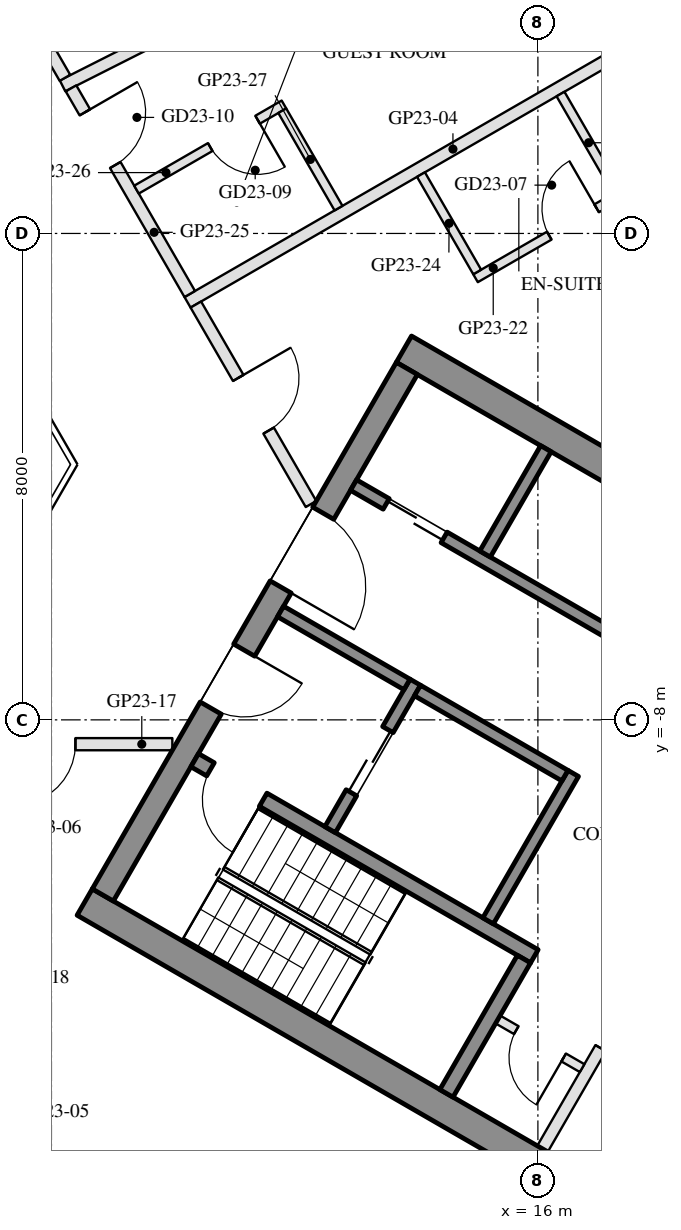
"""IFC4 building model, lengths in metres.
Left out: names, types, materials, properties, quantities, classifications, styles, units other than length and angle.
Written with IfcOpenShell. Run it as: python <this file> out.ifc"""

import sys

from ifc_helpers import new_model, si_unit, direction, frame, frame_2d, origin, place, context, subcontext, project, spatial, rectangle, extrude, element, fill, save


model = new_model("IFC4")
c1 = context("Model", 3, precision=1e-05, world=origin(), true_north=direction((0.0, 1.0)))
c2 = subcontext(c1, "Body", "Model", "MODEL_VIEW")
j1 = project(units=[si_unit("LENGTHUNIT", "METRE"), si_unit("PLANEANGLEUNIT", "RADIAN")], contexts=[c1])
p1 = place(None, origin())
s1 = spatial("IfcSite", under=j1, at=p1, CompositionType="ELEMENT")
p2 = place(p1, origin())
s2 = spatial("IfcBuilding", under=s1, at=p2, CompositionType="ELEMENT")
p3 = place(p2, frame((0.0, 0.0, 250.4)))
s3 = spatial("IfcBuildingStorey", under=s2, at=p3, CompositionType="ELEMENT", Elevation=250.4)
p4 = place(p3, frame((19.729, 2.938, 0.0), z_axis=(0.0, 0.0, 1.0), x_axis=(-0.499976430342, 0.866039011305, 0.0)))
e1 = element("IfcWall", 1, at=p4, inside=s3, PredefinedType="SOLIDWALL", context=c2, shape_type="SweptSolid", body=[
    extrude(rectangle(XDim=6.74, YDim=0.35, at=frame_2d((3.37, 0.0))), origin(), (0.0, 0.0, 1.0), 3.55),
])
p5 = place(p4, frame((1.67, 0.0, 0.0)))
e2 = element("IfcOpeningElement", 2, at=p5, cuts=e1, PredefinedType="OPENING", context=c2, shape_type="SweptSolid", body=[
    extrude(rectangle(XDim=1.5, YDim=2.4, at=frame_2d((0.75, 1.2))), frame((0.0, 0.185, 0.0), z_axis=(0.0, -1.0, 0.0), x_axis=(1.0, 0.0, 0.0)), (0.0, 0.0, 1.0), 0.37),
])
p6 = place(p4, frame((3.47, 0.0, 0.3)))
e3 = element("IfcOpeningElement", 3, at=p6, cuts=e1, PredefinedType="OPENING", context=c2, shape_type="SweptSolid", body=[
    extrude(rectangle(XDim=0.8, YDim=2.65, at=frame_2d((0.4, 1.325))), frame((0.0, 0.185, 0.0), z_axis=(0.0, -1.0, 0.0), x_axis=(1.0, 0.0, 0.0)), (0.0, 0.0, 1.0), 0.37),
])
for number, where, z_axis, x_axis in (
    (4, (8.547, -10.997, 0.0), (0.0, 0.0, 1.0), (0.866, -0.5, 0.0)),
    (5, (13.797, -1.903, 0.0), (0.0, 0.0, 1.0), (0.866, -0.5, 0.0)),
):
    element("IfcWall", number, at=place(p3, frame(where, z_axis=z_axis, x_axis=x_axis)), inside=s3, PredefinedType="SHEAR", context=c2, shape_type="SweptSolid", body=[
        extrude(rectangle(XDim=14.837, YDim=0.5, at=frame_2d((7.418, 0.0))), origin(), (0.0, 0.0, 1.0), 3.5),
    ])
p7 = place(p3, frame((8.845, -10.88, 0.0), z_axis=(0.0, 0.0, 1.0), x_axis=(0.500004234368, 0.866022959057, 0.0)))
e6 = element("IfcWall", 6, at=p7, inside=s3, PredefinedType="SHEAR", context=c2, shape_type="SweptSolid", body=[
    extrude(rectangle(XDim=10.0, YDim=0.4, at=frame_2d((5.0, 0.0))), origin(), (0.0, 0.0, 1.0), 3.5),
])
p8 = place(p7, frame((3.55, 0.0, 0.0)))
e7 = element("IfcOpeningElement", 7, at=p8, cuts=e6, PredefinedType="OPENING", context=c2, shape_type="SweptSolid", body=[
    extrude(rectangle(XDim=1.1, YDim=2.1, at=frame_2d((0.55, 1.05))), frame((0.0, 0.21, 0.0), z_axis=(0.0, -1.0, 0.0), x_axis=(1.0, 0.0, 0.0)), (0.0, 0.0, 1.0), 0.42),
])
p9 = place(p7, frame((5.85, 0.0, 0.0)))
e8 = element("IfcOpeningElement", 8, at=p9, cuts=e6, PredefinedType="OPENING", context=c2, shape_type="SweptSolid", body=[
    extrude(rectangle(XDim=1.4, YDim=2.1, at=frame_2d((0.7, 1.05))), frame((0.0, 0.21, 0.0), z_axis=(0.0, -1.0, 0.0), x_axis=(1.0, 0.0, 0.0)), (0.0, 0.0, 1.0), 0.42),
])
p10 = place(p3, frame((10.356, -8.664, 0.0), z_axis=(0.0, 0.0, 1.0), x_axis=(0.866028629588, -0.499994412703, 0.0)))
e9 = element("IfcWall", 9, at=p10, inside=s3, PredefinedType="SHEAR", context=c2, shape_type="SweptSolid", body=[
    extrude(rectangle(XDim=6.45, YDim=0.25, at=frame_2d((3.225, 0.0))), origin(), (0.0, 0.0, 1.0), 3.5),
])
p11 = place(p10, frame((0.3, 0.0, 0.0)))
e10 = element("IfcOpeningElement", 10, at=p11, cuts=e9, PredefinedType="OPENING", context=c2, shape_type="SweptSolid", body=[
    extrude(rectangle(XDim=1.0, YDim=2.1, at=frame_2d((0.5, 1.05))), frame((0.0, 0.135, 0.0), z_axis=(0.0, -1.0, 0.0), x_axis=(1.0, 0.0, 0.0)), (0.0, 0.0, 1.0), 0.27),
])
p12 = place(p3, frame((14.496, -14.143, 0.0), z_axis=(0.0, 0.0, 1.0), x_axis=(0.500062241894, 0.865989465428, 0.0)))
e11 = element("IfcWall", 11, at=p12, inside=s3, PredefinedType="SHEAR", context=c2, shape_type="SweptSolid", body=[
    extrude(rectangle(XDim=2.55, YDim=0.25, at=frame_2d((1.275, 0.0))), origin(), (0.0, 0.0, 1.0), 3.5),
])
p13 = place(p3, frame((15.181, -11.305, 0.0), z_axis=(0.0, 0.0, 1.0), x_axis=(0.49994636267, 0.866056369097, 0.0)))
e12 = element("IfcWall", 12, at=p13, inside=s3, PredefinedType="SHEAR", context=c2, shape_type="SweptSolid", body=[
    extrude(rectangle(XDim=2.8, YDim=0.2, at=frame_2d((1.4, 0.0))), origin(), (0.0, 0.0, 1.0), 3.5),
])
p14 = place(p3, frame((12.583, -9.805, 0.0), z_axis=(0.0, 0.0, 1.0), x_axis=(0.49994636267, 0.866056369097, 0.0)))
e13 = element("IfcWall", 13, at=p14, inside=s3, PredefinedType="SHEAR", context=c2, shape_type="SweptSolid", body=[
    extrude(rectangle(XDim=2.8, YDim=0.2, at=frame_2d((1.4, 0.0))), origin(), (0.0, 0.0, 1.0), 3.5),
])
p15 = place(p14, frame((0.7, 0.0, 0.0)))
e14 = element("IfcOpeningElement", 14, at=p15, cuts=e13, PredefinedType="OPENING", context=c2, shape_type="SweptSolid", body=[
    extrude(rectangle(XDim=1.2, YDim=2.1, at=frame_2d((0.6, 1.05))), frame((0.0, 0.11, 0.0), z_axis=(0.0, -1.0, 0.0), x_axis=(1.0, 0.0, 0.0)), (0.0, 0.0, 1.0), 0.22),
])
p16 = place(p3, frame((11.768, -6.217, 0.0), z_axis=(0.0, 0.0, 1.0), x_axis=(0.866050077142, -0.499957262057, 0.0)))
e15 = element("IfcWall", 15, at=p16, inside=s3, PredefinedType="SHEAR", context=c2, shape_type="SweptSolid", body=[
    extrude(rectangle(XDim=2.4, YDim=0.2, at=frame_2d((1.2, 0.0))), origin(), (0.0, 0.0, 1.0), 3.5),
])
p17 = place(p3, frame((14.02, -7.517, 0.0), z_axis=(0.0, 0.0, 1.0), x_axis=(0.866034573852, -0.49998411664, 0.0)))
e16 = element("IfcWall", 16, at=p17, inside=s3, PredefinedType="SHEAR", context=c2, shape_type="SweptSolid", body=[
    extrude(rectangle(XDim=2.8, YDim=0.2, at=frame_2d((1.4, 0.0))), origin(), (0.0, 0.0, 1.0), 3.5),
])
p18 = place(p3, frame((12.968, -4.138, 0.0), z_axis=(0.0, 0.0, 1.0), x_axis=(0.866028328073, -0.49999493495, 0.0)))
e17 = element("IfcWall", 17, at=p18, inside=s3, PredefinedType="SHEAR", context=c2, shape_type="SweptSolid", body=[
    extrude(rectangle(XDim=10.16, YDim=0.2, at=frame_2d((5.08, 0.0))), origin(), (0.0, 0.0, 1.0), 3.5),
])
p19 = place(p18, frame((0.62, 0.0, 0.0)))
e18 = element("IfcOpeningElement", 18, at=p19, cuts=e17, PredefinedType="OPENING", context=c2, shape_type="SweptSolid", body=[
    extrude(rectangle(XDim=1.1, YDim=2.1, at=frame_2d((0.55, 1.05))), frame((0.0, 0.11, 0.0), z_axis=(0.0, -1.0, 0.0), x_axis=(1.0, 0.0, 0.0)), (0.0, 0.0, 1.0), 0.22),
])
p20 = place(p18, frame((5.8, 0.0, 0.0)))
e19 = element("IfcOpeningElement", 19, at=p20, cuts=e17, PredefinedType="OPENING", context=c2, shape_type="SweptSolid", body=[
    extrude(rectangle(XDim=0.9, YDim=2.1, at=frame_2d((0.45, 1.05))), frame((0.0, 0.11, 0.0), z_axis=(0.0, -1.0, 0.0), x_axis=(1.0, 0.0, 0.0)), (0.0, 0.0, 1.0), 0.22),
])
p21 = place(p3, frame((15.131, -5.272, 0.0), z_axis=(0.0, 0.0, 1.0), x_axis=(0.499972520799, 0.866041268327, 0.0)))
e20 = element("IfcWall", 20, at=p21, inside=s3, PredefinedType="SHEAR", context=c2, shape_type="SweptSolid", body=[
    extrude(rectangle(XDim=2.0, YDim=0.2, at=frame_2d((1.0, 0.0))), origin(), (0.0, 0.0, 1.0), 3.5),
])
p22 = place(p3, frame((16.076, -15.055, 0.0), z_axis=(0.0, 0.0, 1.0), x_axis=(0.499995103361, 0.866028230842, 0.0)))
e21 = element("IfcWall", 21, at=p22, inside=s3, PredefinedType="PARTITIONING", context=c2, shape_type="SweptSolid", body=[
    extrude(rectangle(XDim=5.4, YDim=0.2, at=frame_2d((2.7, 0.0))), origin(), (0.0, 0.0, 1.0), 3.5),
])
p23 = place(p22, frame((1.913, 0.0, 0.0)))
e22 = element("IfcOpeningElement", 22, at=p23, cuts=e21, PredefinedType="OPENING", context=c2, shape_type="SweptSolid", body=[
    extrude(rectangle(XDim=0.9, YDim=2.1, at=frame_2d((0.45, 1.05))), frame((0.0, 0.11, 0.0), z_axis=(0.0, -1.0, 0.0), x_axis=(1.0, 0.0, 0.0)), (0.0, 0.0, 1.0), 0.22),
])
p24 = place(p22, frame((3.788, 0.0, 0.0)))
e23 = element("IfcOpeningElement", 23, at=p24, cuts=e21, PredefinedType="OPENING", context=c2, shape_type="SweptSolid", body=[
    extrude(rectangle(XDim=0.9, YDim=2.1, at=frame_2d((0.45, 1.05))), frame((0.0, 0.11, 0.0), z_axis=(0.0, -1.0, 0.0), x_axis=(1.0, 0.0, 0.0)), (0.0, 0.0, 1.0), 0.22),
])
p25 = place(p3, frame((15.342, -12.928, 0.0), z_axis=(0.0, 0.0, 1.0), x_axis=(0.865989903783, -0.500061482766, 0.0)))
e24 = element("IfcWall", 24, at=p25, inside=s3, PredefinedType="PARTITIONING", context=c2, shape_type="SweptSolid", body=[
    extrude(rectangle(XDim=1.6, YDim=0.15, at=frame_2d((0.8, 0.0))), origin(), (0.0, 0.0, 1.0), 3.5),
])
p26 = place(p25, frame((0.35, 0.0, 0.0)))
e25 = element("IfcOpeningElement", 25, at=p26, cuts=e24, PredefinedType="OPENING", context=c2, shape_type="SweptSolid", body=[
    extrude(rectangle(XDim=0.9, YDim=2.1, at=frame_2d((0.45, 1.05))), frame((0.0, 0.085, 0.0), z_axis=(0.0, -1.0, 0.0), x_axis=(1.0, 0.0, 0.0)), (0.0, 0.0, 1.0), 0.17),
])
p27 = place(p3, frame((18.968, 3.907, 0.0), z_axis=(0.0, 0.0, 1.0), x_axis=(-0.866022637375, -0.500004791531, 0.0)))
e26 = element("IfcWall", 26, at=p27, inside=s3, PredefinedType="PARTITIONING", context=c2, shape_type="SweptSolid", body=[
    extrude(rectangle(XDim=10.08, YDim=0.2, at=frame_2d((5.04, 0.0))), origin(), (0.0, 0.0, 1.0), 3.1),
])
p28 = place(p3, frame((17.192, 6.982, 0.0), z_axis=(0.0, 0.0, 1.0), x_axis=(-0.892469554868, -0.451107629766, 0.0)))
e27 = element("IfcWall", 27, at=p28, inside=s3, PredefinedType="PARTITIONING", context=c2, shape_type="SweptSolid", body=[
    extrude(rectangle(XDim=10.096, YDim=0.2, at=frame_2d((5.048, 0.0))), origin(), (0.0, 0.0, 1.0), 3.1),
])
p29 = place(p3, frame((9.988, -8.4, 0.0), z_axis=(0.0, 0.0, 1.0), x_axis=(-1.0, 0.0, 0.0)))
e28 = element("IfcWall", 28, at=p29, inside=s3, PredefinedType="PARTITIONING", context=c2, shape_type="SweptSolid", body=[
    extrude(rectangle(XDim=4.188, YDim=0.2, at=frame_2d((2.094, 0.0))), origin(), (0.0, 0.0, 1.0), 2.95),
])
p30 = place(p29, frame((1.594, 0.0, 0.0)))
e29 = element("IfcOpeningElement", 29, at=p30, cuts=e28, PredefinedType="OPENING", context=c2, shape_type="SweptSolid", body=[
    extrude(rectangle(XDim=1.0, YDim=2.1, at=frame_2d((0.5, 1.05))), frame((0.0, 0.11, 0.0), z_axis=(0.0, -1.0, 0.0), x_axis=(1.0, 0.0, 0.0)), (0.0, 0.0, 1.0), 0.22),
])
p31 = place(p3, frame((10.375, -1.169, 0.0), z_axis=(0.0, 0.0, 1.0), x_axis=(0.500055316652, -0.865993464345, 0.0)))
e30 = element("IfcWall", 30, at=p31, inside=s3, PredefinedType="PARTITIONING", context=c2, shape_type="SweptSolid", body=[
    extrude(rectangle(XDim=3.788, YDim=0.2, at=frame_2d((1.894, 0.0))), origin(), (0.0, 0.0, 1.0), 2.95),
])
p32 = place(p31, frame((1.394, 0.0, 0.0)))
e31 = element("IfcOpeningElement", 31, at=p32, cuts=e30, PredefinedType="OPENING", context=c2, shape_type="SweptSolid", body=[
    extrude(rectangle(XDim=1.0, YDim=2.1, at=frame_2d((0.5, 1.05))), frame((0.0, 0.11, 0.0), z_axis=(0.0, -1.0, 0.0), x_axis=(1.0, 0.0, 0.0)), (0.0, 0.0, 1.0), 0.22),
])
p33 = place(p3, frame((14.974, -0.737, 0.0), z_axis=(0.0, 0.0, 1.0), x_axis=(0.866018616679, 0.500011755427, 0.0)))
e32 = element("IfcWall", 32, at=p33, inside=s3, PredefinedType="PARTITIONING", context=c2, shape_type="SweptSolid", body=[
    extrude(rectangle(XDim=2.8, YDim=0.15, at=frame_2d((1.4, 0.0))), origin(), (0.0, 0.0, 1.0), 3.55),
])
p34 = place(p33, frame((1.4, 0.0, 0.0)))
e33 = element("IfcOpeningElement", 33, at=p34, cuts=e32, PredefinedType="OPENING", context=c2, shape_type="SweptSolid", body=[
    extrude(rectangle(XDim=0.9, YDim=2.1, at=frame_2d((0.45, 1.05))), frame((0.0, 0.085, 0.0), z_axis=(0.0, -1.0, 0.0), x_axis=(1.0, 0.0, 0.0)), (0.0, 0.0, 1.0), 0.17),
])
p35 = place(p3, frame((17.297, 0.691, 0.0), z_axis=(0.0, 0.0, 1.0), x_axis=(-0.499985172903, 0.866033964044, 0.0)))
e34 = element("IfcWall", 34, at=p35, inside=s3, PredefinedType="PARTITIONING", context=c2, shape_type="SweptSolid", body=[
    extrude(rectangle(XDim=1.85, YDim=0.15, at=frame_2d((0.925, 0.0))), origin(), (0.0, 0.0, 1.0), 2.95),
])
p36 = place(p3, frame((15.002, -0.634, 0.0), z_axis=(0.0, 0.0, 1.0), x_axis=(-0.500042316284, 0.866000971088, 0.0)))
e35 = element("IfcWall", 35, at=p36, inside=s3, PredefinedType="PARTITIONING", context=c2, shape_type="SweptSolid", body=[
    extrude(rectangle(XDim=1.85, YDim=0.15, at=frame_2d((0.925, 0.0))), origin(), (0.0, 0.0, 1.0), 2.95),
])
p37 = place(p3, frame((8.322, 2.386, 0.0), z_axis=(0.0, 0.0, 1.0), x_axis=(0.499998439657, -0.866026304647, 0.0)))
e36 = element("IfcWall", 36, at=p37, inside=s3, PredefinedType="PARTITIONING", context=c2, shape_type="SweptSolid", body=[
    extrude(rectangle(XDim=3.905, YDim=0.2, at=frame_2d((1.953, 0.0))), origin(), (0.0, 0.0, 1.0), 2.95),
])
p38 = place(p37, frame((0.455, 0.0, 0.0)))
e37 = element("IfcOpeningElement", 37, at=p38, cuts=e36, PredefinedType="OPENING", context=c2, shape_type="SweptSolid", body=[
    extrude(rectangle(XDim=1.0, YDim=2.1, at=frame_2d((0.5, 1.05))), frame((0.0, 0.11, 0.0), z_axis=(0.0, -1.0, 0.0), x_axis=(1.0, 0.0, 0.0)), (0.0, 0.0, 1.0), 0.22),
])
p39 = place(p3, frame((11.823, 2.121, 0.0), z_axis=(0.0, 0.0, 1.0), x_axis=(-0.866034573852, -0.49998411664, 0.0)))
e38 = element("IfcWall", 38, at=p39, inside=s3, PredefinedType="PARTITIONING", context=c2, shape_type="SweptSolid", body=[
    extrude(rectangle(XDim=2.8, YDim=0.15, at=frame_2d((1.4, 0.0))), origin(), (0.0, 0.0, 1.0), 2.95),
])
p40 = place(p39, frame((0.5, 0.0, 0.0)))
e39 = element("IfcOpeningElement", 39, at=p40, cuts=e38, PredefinedType="OPENING", context=c2, shape_type="SweptSolid", body=[
    extrude(rectangle(XDim=0.9, YDim=2.1, at=frame_2d((0.45, 1.05))), frame((0.0, 0.085, 0.0), z_axis=(0.0, -1.0, 0.0), x_axis=(1.0, 0.0, 0.0)), (0.0, 0.0, 1.0), 0.17),
])
p41 = place(p3, frame((12.721, 0.416, 0.0), z_axis=(0.0, 0.0, 1.0), x_axis=(-0.499985172903, 0.866033964044, 0.0)))
e40 = element("IfcWall", 40, at=p41, inside=s3, PredefinedType="PARTITIONING", context=c2, shape_type="SweptSolid", body=[
    extrude(rectangle(XDim=1.85, YDim=0.15, at=frame_2d((0.925, 0.0))), origin(), (0.0, 0.0, 1.0), 3.55),
])
p42 = place(p3, frame((6.325, 5.845, 0.0), z_axis=(0.0, 0.0, 1.0), x_axis=(0.499973105789, -0.866040930607, 0.0)))
e41 = element("IfcWall", 41, at=p42, inside=s3, PredefinedType="PARTITIONING", context=c2, shape_type="SweptSolid", body=[
    extrude(rectangle(XDim=3.794, YDim=0.2, at=frame_2d((1.897, 0.0))), origin(), (0.0, 0.0, 1.0), 2.95),
])
p43 = place(p42, frame((0.403, 0.0, 0.0)))
e42 = element("IfcOpeningElement", 42, at=p43, cuts=e41, PredefinedType="OPENING", context=c2, shape_type="SweptSolid", body=[
    extrude(rectangle(XDim=1.0, YDim=2.1, at=frame_2d((0.5, 1.05))), frame((0.0, 0.11, 0.0), z_axis=(0.0, -1.0, 0.0), x_axis=(1.0, 0.0, 0.0)), (0.0, 0.0, 1.0), 0.22),
])
p44 = place(p15, origin())
e43 = element("IfcDoor", 43, at=p44, inside=s3, OperationType="DOUBLE_DOOR_SLIDING", PredefinedType="DOOR", context=c2, shape_type="SweptSolid", body=[
    extrude(rectangle(XDim=1.2, YDim=2.1, at=frame_2d((0.6, 1.05))), frame((0.0, 0.025, 0.0), z_axis=(0.0, -1.0, 0.0), x_axis=(1.0, 0.0, 0.0)), (0.0, 0.0, 1.0), 0.05),
])
fill(e14, e43)
p45 = place(p26, frame((0.9, 0.0, 0.0), z_axis=(0.0, 0.0, 1.0), x_axis=(-1.0, 0.0, 0.0)))
e44 = element("IfcDoor", 44, at=p45, inside=s3, OperationType="SINGLE_SWING_LEFT", PredefinedType="DOOR", context=c2, shape_type="SweptSolid", body=[
    extrude(rectangle(XDim=0.9, YDim=2.1, at=frame_2d((0.45, 1.05))), frame((0.0, 0.025, 0.0), z_axis=(0.0, -1.0, 0.0), x_axis=(1.0, 0.0, 0.0)), (0.0, 0.0, 1.0), 0.05),
])
fill(e25, e44)
p46 = place(p19, origin())
e45 = element("IfcDoor", 45, at=p46, inside=s3, OperationType="DOUBLE_DOOR_SLIDING", PredefinedType="DOOR", context=c2, shape_type="SweptSolid", body=[
    extrude(rectangle(XDim=1.1, YDim=2.1, at=frame_2d((0.55, 1.05))), frame((0.0, 0.025, 0.0), z_axis=(0.0, -1.0, 0.0), x_axis=(1.0, 0.0, 0.0)), (0.0, 0.0, 1.0), 0.05),
])
fill(e18, e45)
p47 = place(p23, frame((0.9, 0.0, 0.0), z_axis=(0.0, 0.0, 1.0), x_axis=(-1.0, 0.0, 0.0)))
e46 = element("IfcDoor", 46, at=p47, inside=s3, OperationType="SINGLE_SWING_LEFT", PredefinedType="DOOR", context=c2, shape_type="SweptSolid", body=[
    extrude(rectangle(XDim=0.9, YDim=2.1, at=frame_2d((0.45, 1.05))), frame((0.0, 0.025, 0.0), z_axis=(0.0, -1.0, 0.0), x_axis=(1.0, 0.0, 0.0)), (0.0, 0.0, 1.0), 0.05),
])
fill(e22, e46)
p48 = place(p8, frame((1.1, 0.0, 0.0), z_axis=(0.0, 0.0, 1.0), x_axis=(-1.0, 0.0, 0.0)))
e47 = element("IfcDoor", 47, at=p48, inside=s3, OperationType="SINGLE_SWING_LEFT", PredefinedType="DOOR", context=c2, shape_type="SweptSolid", body=[
    extrude(rectangle(XDim=1.1, YDim=2.1, at=frame_2d((0.55, 1.05))), frame((0.0, 0.025, 0.0), z_axis=(0.0, -1.0, 0.0), x_axis=(1.0, 0.0, 0.0)), (0.0, 0.0, 1.0), 0.05),
])
fill(e7, e47)
p49 = place(p9, frame((1.4, 0.0, 0.0), z_axis=(0.0, 0.0, 1.0), x_axis=(-1.0, 0.0, 0.0)))
e48 = element("IfcDoor", 48, at=p49, inside=s3, OperationType="DOUBLE_DOOR_SINGLE_SWING", PredefinedType="DOOR", context=c2, shape_type="SweptSolid", body=[
    extrude(rectangle(XDim=1.4, YDim=2.1, at=frame_2d((0.7, 1.05))), frame((0.0, 0.025, 0.0), z_axis=(0.0, -1.0, 0.0), x_axis=(1.0, 0.0, 0.0)), (0.0, 0.0, 1.0), 0.05),
])
fill(e8, e48)
p50 = place(p11, frame((1.0, 0.0, 0.0), z_axis=(0.0, 0.0, 1.0), x_axis=(-1.0, 0.0, 0.0)))
e49 = element("IfcDoor", 49, at=p50, inside=s3, OperationType="SINGLE_SWING_LEFT", PredefinedType="DOOR", context=c2, shape_type="SweptSolid", body=[
    extrude(rectangle(XDim=1.0, YDim=2.1, at=frame_2d((0.5, 1.05))), frame((0.0, 0.025, 0.0), z_axis=(0.0, -1.0, 0.0), x_axis=(1.0, 0.0, 0.0)), (0.0, 0.0, 1.0), 0.05),
])
fill(e10, e49)
p51 = place(p30, origin())
e50 = element("IfcDoor", 50, at=p51, inside=s3, OperationType="SINGLE_SWING_RIGHT", PredefinedType="DOOR", context=c2, shape_type="SweptSolid", body=[
    extrude(rectangle(XDim=1.0, YDim=2.1, at=frame_2d((0.5, 1.05))), frame((0.0, 0.025, 0.0), z_axis=(0.0, -1.0, 0.0), x_axis=(1.0, 0.0, 0.0)), (0.0, 0.0, 1.0), 0.05),
])
fill(e29, e50)
p52 = place(p34, origin())
e51 = element("IfcDoor", 51, at=p52, inside=s3, OperationType="SINGLE_SWING_RIGHT", PredefinedType="DOOR", context=c2, shape_type="SweptSolid", body=[
    extrude(rectangle(XDim=0.9, YDim=2.1, at=frame_2d((0.45, 1.05))), frame((0.0, 0.025, 0.0), z_axis=(0.0, -1.0, 0.0), x_axis=(1.0, 0.0, 0.0)), (0.0, 0.0, 1.0), 0.05),
])
fill(e33, e51)
p53 = place(p32, origin())
e52 = element("IfcDoor", 52, at=p53, inside=s3, OperationType="SINGLE_SWING_LEFT", PredefinedType="DOOR", context=c2, shape_type="SweptSolid", body=[
    extrude(rectangle(XDim=1.0, YDim=2.1, at=frame_2d((0.5, 1.05))), frame((0.0, 0.025, 0.0), z_axis=(0.0, -1.0, 0.0), x_axis=(1.0, 0.0, 0.0)), (0.0, 0.0, 1.0), 0.05),
])
fill(e31, e52)
p54 = place(p40, origin())
e53 = element("IfcDoor", 53, at=p54, inside=s3, OperationType="SINGLE_SWING_LEFT", PredefinedType="DOOR", context=c2, shape_type="SweptSolid", body=[
    extrude(rectangle(XDim=0.9, YDim=2.1, at=frame_2d((0.45, 1.05))), frame((0.0, 0.025, 0.0), z_axis=(0.0, -1.0, 0.0), x_axis=(1.0, 0.0, 0.0)), (0.0, 0.0, 1.0), 0.05),
])
fill(e39, e53)
p55 = place(p38, origin())
e54 = element("IfcDoor", 54, at=p55, inside=s3, OperationType="SINGLE_SWING_LEFT", PredefinedType="DOOR", context=c2, shape_type="SweptSolid", body=[
    extrude(rectangle(XDim=1.0, YDim=2.1, at=frame_2d((0.5, 1.05))), frame((0.0, 0.025, 0.0), z_axis=(0.0, -1.0, 0.0), x_axis=(1.0, 0.0, 0.0)), (0.0, 0.0, 1.0), 0.05),
])
fill(e37, e54)
save(model, sys.argv[1])
